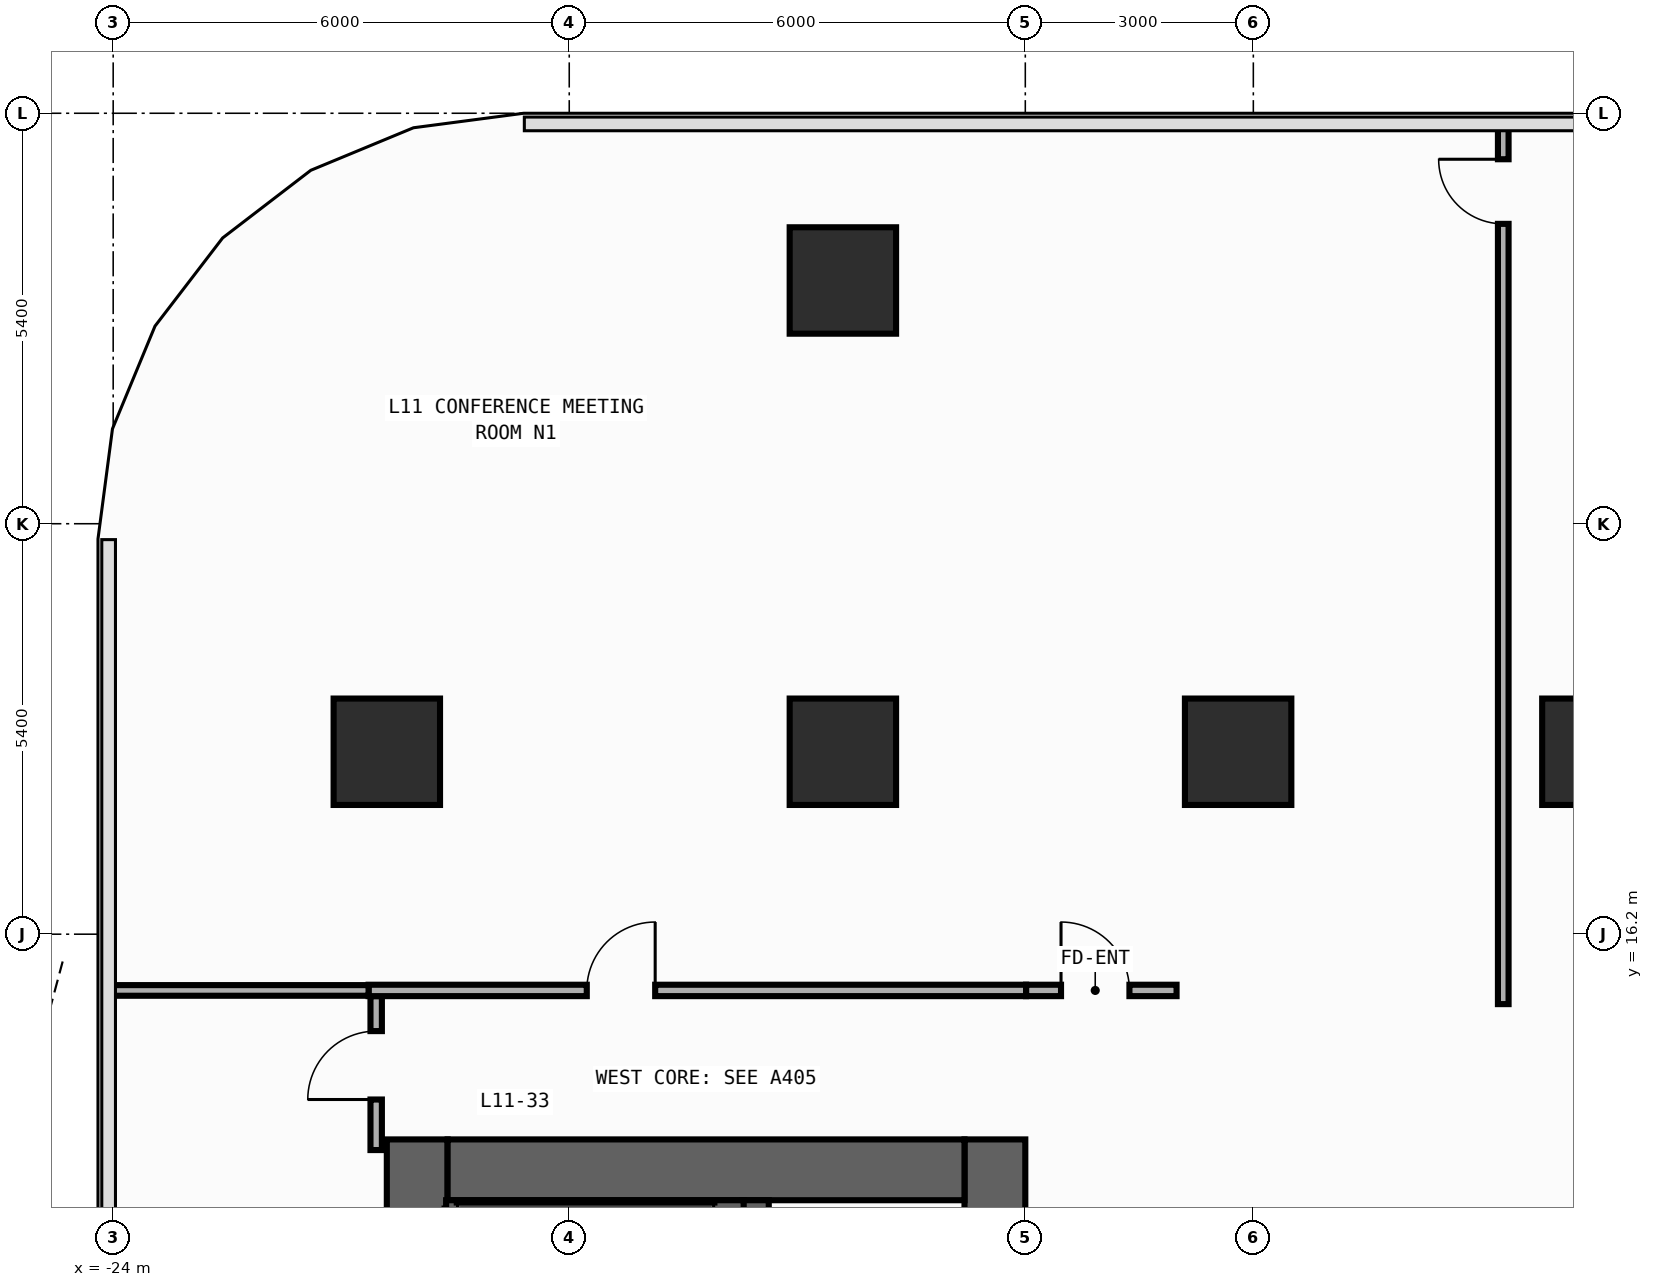
"""IFC4 building model, lengths in metres.
Left out: names, types, materials, properties, quantities, classifications, styles, units other than length and angle.
Written with IfcOpenShell. Run it as: python <this file> out.ifc"""

import sys

from ifc_helpers import new_model, si_unit, direction, frame, frame_2d, origin, origin_2d, place, context, subcontext, project, spatial, rectangle, extrude, element, fill, save


model = new_model("IFC4")
c1 = context("Model", 3, precision=1e-05, world=origin(), true_north=direction((0.0, 1.0)))
c2 = subcontext(c1, "Body", "Model", "MODEL_VIEW")
j1 = project(units=[si_unit("LENGTHUNIT", "METRE"), si_unit("PLANEANGLEUNIT", "RADIAN")], contexts=[c1])
p1 = place(None, origin())
s1 = spatial("IfcSite", under=j1, at=p1, CompositionType="ELEMENT")
p2 = place(p1, origin())
s2 = spatial("IfcBuilding", under=s1, at=p2, CompositionType="ELEMENT")
p3 = place(p2, frame((0.0, 0.0, 47.0)))
s3 = spatial("IfcBuildingStorey", under=s2, at=p3, CompositionType="ELEMENT", Elevation=47.0)
p4 = place(p3, frame((-20.0, -13.5, 0.0), z_axis=(0.0, 0.0, 1.0), x_axis=(0.0, 1.0, 0.0)))
e1 = element("IfcWall", 1, at=p4, inside=s3, PredefinedType="SHEAR", context=c2, shape_type="SweptSolid", body=[
    extrude(rectangle(XDim=27.0, YDim=0.8, at=frame_2d((13.5, 0.0))), origin(), (0.0, 0.0, 1.0), 3.94),
])
p5 = place(p3, frame((-12.4, -13.5, 0.0), z_axis=(0.0, 0.0, 1.0), x_axis=(0.0, 1.0, 0.0)))
e2 = element("IfcWall", 2, at=p5, inside=s3, PredefinedType="SHEAR", context=c2, shape_type="SweptSolid", body=[
    extrude(rectangle(XDim=27.0, YDim=0.8, at=frame_2d((13.5, 0.0))), origin(), (0.0, 0.0, 1.0), 3.94),
])
p6 = place(p5, frame((21.55, 0.0, 0.0)))
e3 = element("IfcOpeningElement", 3, at=p6, cuts=e2, PredefinedType="OPENING", context=c2, shape_type="SweptSolid", body=[
    extrude(rectangle(XDim=1.1, YDim=2.2, at=frame_2d((0.55, 1.1))), frame((0.0, 0.41, 0.0), z_axis=(0.0, -1.0, 0.0), x_axis=(1.0, 0.0, 0.0)), (0.0, 0.0, 1.0), 0.82),
])
p7 = place(p5, frame((18.35, 0.0, 0.0)))
e4 = element("IfcOpeningElement", 4, at=p7, cuts=e2, PredefinedType="OPENING", context=c2, shape_type="SweptSolid", body=[
    extrude(rectangle(XDim=1.1, YDim=2.2, at=frame_2d((0.55, 1.1))), frame((0.0, 0.41, 0.0), z_axis=(0.0, -1.0, 0.0), x_axis=(1.0, 0.0, 0.0)), (0.0, 0.0, 1.0), 0.82),
])
p8 = place(p5, frame((15.15, 0.0, 0.0)))
e5 = element("IfcOpeningElement", 5, at=p8, cuts=e2, PredefinedType="OPENING", context=c2, shape_type="SweptSolid", body=[
    extrude(rectangle(XDim=1.1, YDim=2.2, at=frame_2d((0.55, 1.1))), frame((0.0, 0.41, 0.0), z_axis=(0.0, -1.0, 0.0), x_axis=(1.0, 0.0, 0.0)), (0.0, 0.0, 1.0), 0.82),
])
p9 = place(p5, frame((10.35, 0.0, 0.0)))
e6 = element("IfcOpeningElement", 6, at=p9, cuts=e2, PredefinedType="OPENING", context=c2, shape_type="SweptSolid", body=[
    extrude(rectangle(XDim=1.1, YDim=2.2, at=frame_2d((0.55, 1.1))), frame((0.0, 0.41, 0.0), z_axis=(0.0, -1.0, 0.0), x_axis=(1.0, 0.0, 0.0)), (0.0, 0.0, 1.0), 0.82),
])
p10 = place(p5, frame((7.15, 0.0, 0.0)))
e7 = element("IfcOpeningElement", 7, at=p10, cuts=e2, PredefinedType="OPENING", context=c2, shape_type="SweptSolid", body=[
    extrude(rectangle(XDim=1.1, YDim=2.2, at=frame_2d((0.55, 1.1))), frame((0.0, 0.41, 0.0), z_axis=(0.0, -1.0, 0.0), x_axis=(1.0, 0.0, 0.0)), (0.0, 0.0, 1.0), 0.82),
])
p11 = place(p5, frame((3.95, 0.0, 0.0)))
e8 = element("IfcOpeningElement", 8, at=p11, cuts=e2, PredefinedType="OPENING", context=c2, shape_type="SweptSolid", body=[
    extrude(rectangle(XDim=1.1, YDim=2.2, at=frame_2d((0.55, 1.1))), frame((0.0, 0.41, 0.0), z_axis=(0.0, -1.0, 0.0), x_axis=(1.0, 0.0, 0.0)), (0.0, 0.0, 1.0), 0.82),
])
p12 = place(p5, frame((12.725, 0.0, 0.0)))
e9 = element("IfcOpeningElement", 9, at=p12, cuts=e2, PredefinedType="OPENING", context=c2, shape_type="SweptSolid", body=[
    extrude(rectangle(XDim=1.15, YDim=2.2, at=frame_2d((0.575, 1.1))), frame((0.0, 0.41, 0.0), z_axis=(0.0, -1.0, 0.0), x_axis=(1.0, 0.0, 0.0)), (0.0, 0.0, 1.0), 0.82),
])
p13 = place(p5, frame((1.625, 0.0, 0.0)))
e10 = element("IfcOpeningElement", 10, at=p13, cuts=e2, PredefinedType="OPENING", context=c2, shape_type="SweptSolid", body=[
    extrude(rectangle(XDim=0.85, YDim=2.1, at=frame_2d((0.425, 1.05))), frame((0.0, 0.41, 0.0), z_axis=(0.0, -1.0, 0.0), x_axis=(1.0, 0.0, 0.0)), (0.0, 0.0, 1.0), 0.82),
])
p14 = place(p3, frame((-19.6, 13.1, 0.0), z_axis=(0.0, 0.0, 1.0), x_axis=(1.0, 0.0, 0.0)))
e11 = element("IfcWall", 11, at=p14, inside=s3, PredefinedType="SHEAR", context=c2, shape_type="SweptSolid", body=[
    extrude(rectangle(XDim=6.8, YDim=0.8, at=frame_2d((3.4, 0.0))), origin(), (0.0, 0.0, 1.0), 3.94),
])
p15 = place(p3, frame((-15.55, -12.7, 0.0), z_axis=(0.0, 0.0, 1.0), x_axis=(0.0, 1.0, 0.0)))
e12 = element("IfcWall", 12, at=p15, inside=s3, PredefinedType="SHEAR", context=c2, shape_type="SweptSolid", body=[
    extrude(rectangle(XDim=25.4, YDim=0.35, at=frame_2d((12.7, 0.0))), origin(), (0.0, 0.0, 1.0), 3.94),
])
p16 = place(p15, frame((11.925, 0.0, 0.0)))
e13 = element("IfcOpeningElement", 13, at=p16, cuts=e12, PredefinedType="OPENING", context=c2, shape_type="SweptSolid", body=[
    extrude(rectangle(XDim=1.15, YDim=2.2, at=frame_2d((0.575, 1.1))), frame((0.0, 0.185, 0.0), z_axis=(0.0, -1.0, 0.0), x_axis=(1.0, 0.0, 0.0)), (0.0, 0.0, 1.0), 0.37),
])
p17 = place(p15, frame((0.825, 0.0, 0.0)))
e14 = element("IfcOpeningElement", 14, at=p17, cuts=e12, PredefinedType="OPENING", context=c2, shape_type="SweptSolid", body=[
    extrude(rectangle(XDim=0.85, YDim=2.1, at=frame_2d((0.425, 1.05))), frame((0.0, 0.185, 0.0), z_axis=(0.0, -1.0, 0.0), x_axis=(1.0, 0.0, 0.0)), (0.0, 0.0, 1.0), 0.37),
])
p18 = place(p3, frame((-19.62, 12.59, 0.0), z_axis=(0.0, 0.0, 1.0), x_axis=(1.0, 0.0, 0.0)))
e15 = element("IfcWall", 15, at=p18, inside=s3, PredefinedType="SHEAR", context=c2, shape_type="SweptSolid", body=[
    extrude(rectangle(XDim=3.915, YDim=0.22, at=frame_2d((1.958, 0.0))), origin(), (0.0, 0.0, 1.0), 3.94),
])
for number, where, z_axis, x_axis in (
    (16, (-9.2, 18.6, 0.0), (0.0, 0.0, 1.0), (1.0, 0.0, 0.0)),
    (17, (-20.4, 18.6, 0.0), (0.0, 0.0, 1.0), (1.0, 0.0, 0.0)),
    (18, (-14.4, 18.6, 0.0), (0.0, 0.0, 1.0), (1.0, 0.0, 0.0)),
    (19, (-4.5, 18.6, 0.0), (0.0, 0.0, 1.0), (1.0, 0.0, 0.0)),
    (20, (-14.4, 24.8, 0.0), (0.0, 0.0, 1.0), (1.0, 0.0, 0.0)),
):
    element("IfcColumn", number, at=place(p3, frame(where, z_axis=z_axis, x_axis=x_axis)), inside=s3, PredefinedType="COLUMN", context=c2, shape_type="SweptSolid", body=[
        extrude(rectangle(XDim=1.4, YDim=1.4, at=origin_2d()), origin(), (0.0, 0.0, 1.0), 4.2),
    ])
p19 = place(p3, frame((-11.99, 15.46, 0.0), z_axis=(0.0, 0.0, 1.0), x_axis=(1.0, 0.0, 0.0)))
e21 = element("IfcWall", 21, at=p19, inside=s3, PredefinedType="PARTITIONING", context=c2, shape_type="SweptSolid", body=[
    extrude(rectangle(XDim=1.98, YDim=0.15, at=frame_2d((0.99, 0.0))), origin(), (0.0, 0.0, 1.0), 3.94),
])
p20 = place(p19, frame((0.46, 0.0, 0.0)))
e22 = element("IfcOpeningElement", 22, at=p20, cuts=e21, PredefinedType="OPENING", context=c2, shape_type="SweptSolid", body=[
    extrude(rectangle(XDim=0.9, YDim=2.15, at=frame_2d((0.45, 1.075))), frame((0.0, 0.085, 0.0), z_axis=(0.0, -1.0, 0.0), x_axis=(1.0, 0.0, 0.0)), (0.0, 0.0, 1.0), 0.17),
])
p21 = place(p3, frame((-20.54, 13.36, 0.0), z_axis=(0.0, 0.0, 1.0), x_axis=(0.0, 1.0, 0.0)))
e23 = element("IfcWall", 23, at=p21, inside=s3, PredefinedType="PARTITIONING", context=c2, shape_type="SweptSolid", body=[
    extrude(rectangle(XDim=2.025, YDim=0.15, at=frame_2d((1.012, 0.0))), origin(), (0.0, 0.0, 1.0), 3.94),
])
p22 = place(p21, frame((0.665, 0.0, 0.0)))
e24 = element("IfcOpeningElement", 24, at=p22, cuts=e23, PredefinedType="OPENING", context=c2, shape_type="SweptSolid", body=[
    extrude(rectangle(XDim=0.9, YDim=2.15, at=frame_2d((0.45, 1.075))), frame((0.0, 0.085, 0.0), z_axis=(0.0, -1.0, 0.0), x_axis=(1.0, 0.0, 0.0)), (0.0, 0.0, 1.0), 0.17),
])
p23 = place(p3, frame((-20.64, 15.46, 0.0), z_axis=(0.0, 0.0, 1.0), x_axis=(1.0, 0.0, 0.0)))
e25 = element("IfcWall", 25, at=p23, inside=s3, PredefinedType="PARTITIONING", context=c2, shape_type="SweptSolid", body=[
    extrude(rectangle(XDim=8.65, YDim=0.15, at=frame_2d((4.325, 0.0))), origin(), (0.0, 0.0, 1.0), 3.94),
])
p24 = place(p23, frame((2.871, 0.0, 0.0)))
e26 = element("IfcOpeningElement", 26, at=p24, cuts=e25, PredefinedType="OPENING", context=c2, shape_type="SweptSolid", body=[
    extrude(rectangle(XDim=0.9, YDim=2.15, at=frame_2d((0.45, 1.075))), frame((0.0, 0.085, 0.0), z_axis=(0.0, -1.0, 0.0), x_axis=(1.0, 0.0, 0.0)), (0.0, 0.0, 1.0), 0.17),
])
p25 = place(p3, frame((-24.055, 15.46, 0.0), z_axis=(0.0, 0.0, 1.0), x_axis=(1.0, 0.0, 0.0)))
e27 = element("IfcWall", 27, at=p25, inside=s3, PredefinedType="PARTITIONING", context=c2, shape_type="SweptSolid", body=[
    extrude(rectangle(XDim=3.415, YDim=0.14, at=frame_2d((1.708, 0.0))), origin(), (0.0, 0.0, 1.0), 3.94),
])
p26 = place(p3, frame((-5.712, 15.28, 0.0), z_axis=(0.0, 0.0, 1.0), x_axis=(0.0, 1.0, 0.0)))
e28 = element("IfcWall", 28, at=p26, inside=s3, PredefinedType="PARTITIONING", context=c2, shape_type="SweptSolid", body=[
    extrude(rectangle(XDim=11.575, YDim=0.14, at=frame_2d((5.788, 0.0))), origin(), (0.0, 0.0, 1.0), 3.94),
])
p27 = place(p26, frame((10.265, 0.0, 0.0)))
e29 = element("IfcOpeningElement", 29, at=p27, cuts=e28, PredefinedType="OPENING", context=c2, shape_type="SweptSolid", body=[
    extrude(rectangle(XDim=0.85, YDim=2.1, at=frame_2d((0.425, 1.05))), frame((0.0, 0.08, 0.0), z_axis=(0.0, -1.0, 0.0), x_axis=(1.0, 0.0, 0.0)), (0.0, 0.0, 1.0), 0.16),
])
p28 = place(p20, origin())
e30 = element("IfcDoor", 30, at=p28, inside=s3, OperationType="SINGLE_SWING_LEFT", PredefinedType="DOOR", context=c2, shape_type="SweptSolid", body=[
    extrude(rectangle(XDim=0.9, YDim=2.15, at=frame_2d((0.45, 1.075))), frame((0.0, 0.025, 0.0), z_axis=(0.0, -1.0, 0.0), x_axis=(1.0, 0.0, 0.0)), (0.0, 0.0, 1.0), 0.05),
])
fill(e22, e30)
p29 = place(p22, origin())
e31 = element("IfcDoor", 31, at=p29, inside=s3, OperationType="SINGLE_SWING_LEFT", PredefinedType="DOOR", context=c2, shape_type="SweptSolid", body=[
    extrude(rectangle(XDim=0.9, YDim=2.15, at=frame_2d((0.45, 1.075))), frame((0.0, 0.025, 0.0), z_axis=(0.0, -1.0, 0.0), x_axis=(1.0, 0.0, 0.0)), (0.0, 0.0, 1.0), 0.05),
])
fill(e24, e31)
p30 = place(p24, origin())
e32 = element("IfcDoor", 32, at=p30, inside=s3, OperationType="SINGLE_SWING_RIGHT", PredefinedType="DOOR", context=c2, shape_type="SweptSolid", body=[
    extrude(rectangle(XDim=0.9, YDim=2.15, at=frame_2d((0.45, 1.075))), frame((0.0, 0.025, 0.0), z_axis=(0.0, -1.0, 0.0), x_axis=(1.0, 0.0, 0.0)), (0.0, 0.0, 1.0), 0.05),
])
fill(e26, e32)
p31 = place(p27, origin())
e33 = element("IfcDoor", 33, at=p31, inside=s3, OperationType="SINGLE_SWING_RIGHT", PredefinedType="DOOR", context=c2, shape_type="SweptSolid", body=[
    extrude(rectangle(XDim=0.85, YDim=2.1, at=frame_2d((0.425, 1.05))), frame((0.0, 0.025, 0.0), z_axis=(0.0, -1.0, 0.0), x_axis=(1.0, 0.0, 0.0)), (0.0, 0.0, 1.0), 0.05),
])
fill(e29, e33)
save(model, sys.argv[1])
